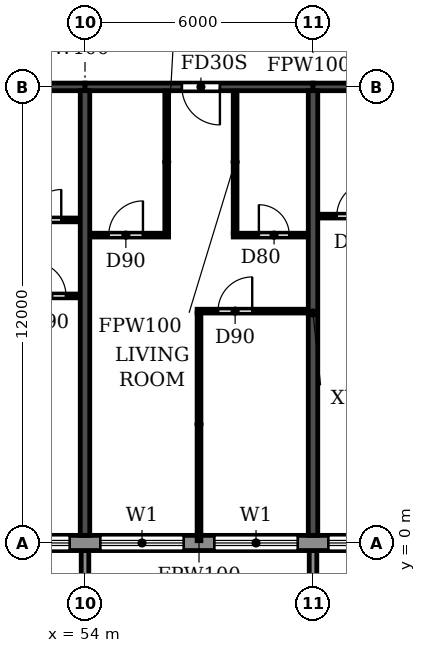
"""IFC4 building model, lengths in metres.
Left out: names, types, materials, properties, quantities, classifications, styles, units other than length and angle.
Written with IfcOpenShell. Run it as: python <this file> out.ifc"""

import sys

from ifc_helpers import new_model, si_unit, direction, frame, frame_2d, origin, place, context, subcontext, project, spatial, polyline, rectangle, outline, extrude, source, transform, mapped, element, fill, save


model = new_model("IFC4")
c1 = context("Model", 3, precision=1e-05, world=origin(), true_north=direction((0.0, 1.0)))
c2 = subcontext(c1, "Body", "Model", "MODEL_VIEW")
j1 = project(units=[si_unit("LENGTHUNIT", "METRE"), si_unit("PLANEANGLEUNIT", "RADIAN")], contexts=[c1])
p1 = place(None, origin())
s1 = spatial("IfcSite", under=j1, at=p1, CompositionType="ELEMENT")
p2 = place(p1, origin())
s2 = spatial("IfcBuilding", under=s1, at=p2, CompositionType="ELEMENT")
p3 = place(p2, frame((0.0, 0.0, 191.7)))
s3 = spatial("IfcBuildingStorey", under=s2, at=p3, CompositionType="ELEMENT", Elevation=191.7)
for number, where, z_axis, x_axis in (
    (1, (54.0, 0.2, 0.0), (0.0, 0.0, 1.0), (0.0, 1.0, 0.0)),
    (2, (60.0, 0.2, 0.0), (0.0, 0.0, 1.0), (0.0, 1.0, 0.0)),
):
    element("IfcWall", number, at=place(p3, frame(where, z_axis=z_axis, x_axis=x_axis)), inside=s3, PredefinedType="SHEAR", context=c2, shape_type="SweptSolid", body=[
        extrude(rectangle(XDim=11.7, YDim=0.25, at=frame_2d((5.85, 0.0))), origin(), (0.0, 0.0, 1.0), 3.08),
    ])
p4 = place(p3, frame((48.0, 12.0, 0.0), z_axis=(0.0, 0.0, 1.0), x_axis=(1.0, 0.0, 0.0)))
e3 = element("IfcWall", 3, at=p4, inside=s3, PredefinedType="SHEAR", context=c2, shape_type="SweptSolid", body=[
    extrude(rectangle(XDim=6.0, YDim=0.2, at=frame_2d((3.0, 0.0))), origin(), (0.0, 0.0, 1.0), 2.48),
])
p5 = place(p4, frame((2.55, 0.0, 0.0)))
e4 = element("IfcOpeningElement", 4, at=p5, cuts=e3, PredefinedType="OPENING", context=c2, shape_type="SweptSolid", body=[
    extrude(rectangle(XDim=1.0, YDim=2.1, at=frame_2d((0.5, 1.05))), frame((0.0, 0.11, 0.0), z_axis=(0.0, -1.0, 0.0), x_axis=(1.0, 0.0, 0.0)), (0.0, 0.0, 1.0), 0.22),
])
p6 = place(p3, frame((54.0, 12.0, 0.0), z_axis=(0.0, 0.0, 1.0), x_axis=(1.0, 0.0, 0.0)))
e5 = element("IfcWall", 5, at=p6, inside=s3, PredefinedType="SHEAR", context=c2, shape_type="SweptSolid", body=[
    extrude(rectangle(XDim=6.0, YDim=0.2, at=frame_2d((3.0, 0.0))), origin(), (0.0, 0.0, 1.0), 2.48),
])
p7 = place(p6, frame((2.55, 0.0, 0.0)))
e6 = element("IfcOpeningElement", 6, at=p7, cuts=e5, PredefinedType="OPENING", context=c2, shape_type="SweptSolid", body=[
    extrude(rectangle(XDim=1.0, YDim=2.1, at=frame_2d((0.5, 1.05))), frame((0.0, 0.11, 0.0), z_axis=(0.0, -1.0, 0.0), x_axis=(1.0, 0.0, 0.0)), (0.0, 0.0, 1.0), 0.22),
])
p8 = place(p3, frame((60.0, 12.0, 0.0), z_axis=(0.0, 0.0, 1.0), x_axis=(1.0, 0.0, 0.0)))
e7 = element("IfcWall", 7, at=p8, inside=s3, PredefinedType="SHEAR", context=c2, shape_type="SweptSolid", body=[
    extrude(rectangle(XDim=6.0, YDim=0.2, at=frame_2d((3.0, 0.0))), origin(), (0.0, 0.0, 1.0), 2.48),
])
p9 = place(p8, frame((2.55, 0.0, 0.0)))
e8 = element("IfcOpeningElement", 8, at=p9, cuts=e7, PredefinedType="OPENING", context=c2, shape_type="SweptSolid", body=[
    extrude(rectangle(XDim=1.0, YDim=2.1, at=frame_2d((0.5, 1.05))), frame((0.0, 0.11, 0.0), z_axis=(0.0, -1.0, 0.0), x_axis=(1.0, 0.0, 0.0)), (0.0, 0.0, 1.0), 0.22),
])
p10 = place(p3, frame((22.683, 0.0, 0.0), z_axis=(0.0, 0.0, 1.0), x_axis=(1.0, 0.0, 0.0)))
e9 = element("IfcWall", 9, at=p10, inside=s3, PredefinedType="STANDARD", context=c2, shape_type="SweptSolid", body=[
    extrude(rectangle(XDim=56.634, YDim=0.4, at=frame_2d((28.317, 0.0))), origin(), (0.0, 0.0, 1.0), 3.08),
])
p11 = place(p10, frame((1.717, 0.0, 0.9)))
e10 = element("IfcOpeningElement", 10, at=p11, cuts=e9, PredefinedType="OPENING", context=c2, shape_type="SweptSolid", body=[
    extrude(rectangle(XDim=2.2, YDim=1.5, at=frame_2d((1.1, 0.75))), frame((0.0, 0.21, 0.0), z_axis=(0.0, -1.0, 0.0), x_axis=(1.0, 0.0, 0.0)), (0.0, 0.0, 1.0), 0.42),
])
p12 = place(p10, frame((4.917, 0.0, 0.0)))
e11 = element("IfcOpeningElement", 11, at=p12, cuts=e9, PredefinedType="OPENING", context=c2, shape_type="SweptSolid", body=[
    extrude(rectangle(XDim=1.8, YDim=2.4, at=frame_2d((0.9, 1.2))), frame((0.0, 0.21, 0.0), z_axis=(0.0, -1.0, 0.0), x_axis=(1.0, 0.0, 0.0)), (0.0, 0.0, 1.0), 0.42),
])
p13 = place(p10, frame((7.717, 0.0, 0.9)))
e12 = element("IfcOpeningElement", 12, at=p13, cuts=e9, PredefinedType="OPENING", context=c2, shape_type="SweptSolid", body=[
    extrude(rectangle(XDim=2.2, YDim=1.5, at=frame_2d((1.1, 0.75))), frame((0.0, 0.21, 0.0), z_axis=(0.0, -1.0, 0.0), x_axis=(1.0, 0.0, 0.0)), (0.0, 0.0, 1.0), 0.42),
])
p14 = place(p10, frame((10.717, 0.0, 0.9)))
e13 = element("IfcOpeningElement", 13, at=p14, cuts=e9, PredefinedType="OPENING", context=c2, shape_type="SweptSolid", body=[
    extrude(rectangle(XDim=2.2, YDim=1.5, at=frame_2d((1.1, 0.75))), frame((0.0, 0.21, 0.0), z_axis=(0.0, -1.0, 0.0), x_axis=(1.0, 0.0, 0.0)), (0.0, 0.0, 1.0), 0.42),
])
p15 = place(p10, frame((13.717, 0.0, 0.9)))
e14 = element("IfcOpeningElement", 14, at=p15, cuts=e9, PredefinedType="OPENING", context=c2, shape_type="SweptSolid", body=[
    extrude(rectangle(XDim=2.2, YDim=1.5, at=frame_2d((1.1, 0.75))), frame((0.0, 0.21, 0.0), z_axis=(0.0, -1.0, 0.0), x_axis=(1.0, 0.0, 0.0)), (0.0, 0.0, 1.0), 0.42),
])
p16 = place(p10, frame((16.917, 0.0, 0.0)))
e15 = element("IfcOpeningElement", 15, at=p16, cuts=e9, PredefinedType="OPENING", context=c2, shape_type="SweptSolid", body=[
    extrude(rectangle(XDim=1.8, YDim=2.4, at=frame_2d((0.9, 1.2))), frame((0.0, 0.21, 0.0), z_axis=(0.0, -1.0, 0.0), x_axis=(1.0, 0.0, 0.0)), (0.0, 0.0, 1.0), 0.42),
])
p17 = place(p10, frame((19.717, 0.0, 0.9)))
e16 = element("IfcOpeningElement", 16, at=p17, cuts=e9, PredefinedType="OPENING", context=c2, shape_type="SweptSolid", body=[
    extrude(rectangle(XDim=2.2, YDim=1.5, at=frame_2d((1.1, 0.75))), frame((0.0, 0.21, 0.0), z_axis=(0.0, -1.0, 0.0), x_axis=(1.0, 0.0, 0.0)), (0.0, 0.0, 1.0), 0.42),
])
p18 = place(p10, frame((22.717, 0.0, 0.9)))
e17 = element("IfcOpeningElement", 17, at=p18, cuts=e9, PredefinedType="OPENING", context=c2, shape_type="SweptSolid", body=[
    extrude(rectangle(XDim=2.2, YDim=1.5, at=frame_2d((1.1, 0.75))), frame((0.0, 0.21, 0.0), z_axis=(0.0, -1.0, 0.0), x_axis=(1.0, 0.0, 0.0)), (0.0, 0.0, 1.0), 0.42),
])
p19 = place(p10, frame((25.917, 0.0, 0.0)))
e18 = element("IfcOpeningElement", 18, at=p19, cuts=e9, PredefinedType="OPENING", context=c2, shape_type="SweptSolid", body=[
    extrude(rectangle(XDim=1.8, YDim=2.4, at=frame_2d((0.9, 1.2))), frame((0.0, 0.21, 0.0), z_axis=(0.0, -1.0, 0.0), x_axis=(1.0, 0.0, 0.0)), (0.0, 0.0, 1.0), 0.42),
])
p20 = place(p10, frame((28.717, 0.0, 0.9)))
e19 = element("IfcOpeningElement", 19, at=p20, cuts=e9, PredefinedType="OPENING", context=c2, shape_type="SweptSolid", body=[
    extrude(rectangle(XDim=2.2, YDim=1.5, at=frame_2d((1.1, 0.75))), frame((0.0, 0.21, 0.0), z_axis=(0.0, -1.0, 0.0), x_axis=(1.0, 0.0, 0.0)), (0.0, 0.0, 1.0), 0.42),
])
p21 = place(p10, frame((31.717, 0.0, 0.9)))
e20 = element("IfcOpeningElement", 20, at=p21, cuts=e9, PredefinedType="OPENING", context=c2, shape_type="SweptSolid", body=[
    extrude(rectangle(XDim=2.2, YDim=1.5, at=frame_2d((1.1, 0.75))), frame((0.0, 0.21, 0.0), z_axis=(0.0, -1.0, 0.0), x_axis=(1.0, 0.0, 0.0)), (0.0, 0.0, 1.0), 0.42),
])
p22 = place(p10, frame((34.717, 0.0, 0.9)))
e21 = element("IfcOpeningElement", 21, at=p22, cuts=e9, PredefinedType="OPENING", context=c2, shape_type="SweptSolid", body=[
    extrude(rectangle(XDim=2.2, YDim=1.5, at=frame_2d((1.1, 0.75))), frame((0.0, 0.21, 0.0), z_axis=(0.0, -1.0, 0.0), x_axis=(1.0, 0.0, 0.0)), (0.0, 0.0, 1.0), 0.42),
])
p23 = place(p10, frame((37.717, 0.0, 0.9)))
e22 = element("IfcOpeningElement", 22, at=p23, cuts=e9, PredefinedType="OPENING", context=c2, shape_type="SweptSolid", body=[
    extrude(rectangle(XDim=2.2, YDim=1.5, at=frame_2d((1.1, 0.75))), frame((0.0, 0.21, 0.0), z_axis=(0.0, -1.0, 0.0), x_axis=(1.0, 0.0, 0.0)), (0.0, 0.0, 1.0), 0.42),
])
p24 = place(p10, frame((40.917, 0.0, 0.0)))
e23 = element("IfcOpeningElement", 23, at=p24, cuts=e9, PredefinedType="OPENING", context=c2, shape_type="SweptSolid", body=[
    extrude(rectangle(XDim=1.8, YDim=2.4, at=frame_2d((0.9, 1.2))), frame((0.0, 0.21, 0.0), z_axis=(0.0, -1.0, 0.0), x_axis=(1.0, 0.0, 0.0)), (0.0, 0.0, 1.0), 0.42),
])
p25 = place(p10, frame((43.717, 0.0, 0.9)))
e24 = element("IfcOpeningElement", 24, at=p25, cuts=e9, PredefinedType="OPENING", context=c2, shape_type="SweptSolid", body=[
    extrude(rectangle(XDim=2.2, YDim=1.5, at=frame_2d((1.1, 0.75))), frame((0.0, 0.21, 0.0), z_axis=(0.0, -1.0, 0.0), x_axis=(1.0, 0.0, 0.0)), (0.0, 0.0, 1.0), 0.42),
])
p26 = place(p10, frame((46.717, 0.0, 0.9)))
e25 = element("IfcOpeningElement", 25, at=p26, cuts=e9, PredefinedType="OPENING", context=c2, shape_type="SweptSolid", body=[
    extrude(rectangle(XDim=2.2, YDim=1.5, at=frame_2d((1.1, 0.75))), frame((0.0, 0.21, 0.0), z_axis=(0.0, -1.0, 0.0), x_axis=(1.0, 0.0, 0.0)), (0.0, 0.0, 1.0), 0.42),
])
p27 = place(p10, frame((49.917, 0.0, 0.0)))
e26 = element("IfcOpeningElement", 26, at=p27, cuts=e9, PredefinedType="OPENING", context=c2, shape_type="SweptSolid", body=[
    extrude(rectangle(XDim=1.8, YDim=2.4, at=frame_2d((0.9, 1.2))), frame((0.0, 0.21, 0.0), z_axis=(0.0, -1.0, 0.0), x_axis=(1.0, 0.0, 0.0)), (0.0, 0.0, 1.0), 0.42),
])
p28 = place(p10, frame((52.717, 0.0, 0.9)))
e27 = element("IfcOpeningElement", 27, at=p28, cuts=e9, PredefinedType="OPENING", context=c2, shape_type="SweptSolid", body=[
    extrude(rectangle(XDim=2.2, YDim=1.5, at=frame_2d((1.1, 0.75))), frame((0.0, 0.21, 0.0), z_axis=(0.0, -1.0, 0.0), x_axis=(1.0, 0.0, 0.0)), (0.0, 0.0, 1.0), 0.42),
])
m1 = source(origin(), c2, "Body", "SweptSolid", [
    extrude(outline(polyline([(0.0, 0.0), (0.2, 0.0), (0.2, 1.65), (0.0, 1.65), (0.0, 0.0)])), origin(), (0.0, 0.0, 1.0), 3.1),
])
for number, where in (
    (28, (53.9, -1.85, 0.0)),
    (29, (59.9, -1.85, 0.0)),
):
    element("IfcWall", number, at=place(p3, frame(where)), inside=s3, PredefinedType="STANDARD", context=c2, shape_type="MappedRepresentation", body=[
        mapped(m1, transform((0.0, 0.0, 0.0))),
    ])
p29 = place(p3, frame((56.95, 6.1, 0.0), z_axis=(0.0, 0.0, 1.0), x_axis=(1.0, 0.0, 0.0)))
e30 = element("IfcWall", 30, at=p29, inside=s3, PredefinedType="PARTITIONING", context=c2, shape_type="SweptSolid", body=[
    extrude(rectangle(XDim=2.915, YDim=0.1, at=frame_2d((1.458, 0.0))), origin(), (0.0, 0.0, 1.0), 3.08),
])
p30 = place(p29, frame((0.55, 0.0, 0.0)))
e31 = element("IfcOpeningElement", 31, at=p30, cuts=e30, PredefinedType="OPENING", context=c2, shape_type="SweptSolid", body=[
    extrude(rectangle(XDim=0.9, YDim=2.1, at=frame_2d((0.45, 1.05))), frame((0.0, 0.06, 0.0), z_axis=(0.0, -1.0, 0.0), x_axis=(1.0, 0.0, 0.0)), (0.0, 0.0, 1.0), 0.12),
])
p31 = place(p3, frame((50.95, 6.5, 0.0), z_axis=(0.0, 0.0, 1.0), x_axis=(1.0, 0.0, 0.0)))
e32 = element("IfcWall", 32, at=p31, inside=s3, PredefinedType="PARTITIONING", context=c2, shape_type="SweptSolid", body=[
    extrude(rectangle(XDim=2.915, YDim=0.1, at=frame_2d((1.458, 0.0))), origin(), (0.0, 0.0, 1.0), 3.08),
])
p32 = place(p31, frame((1.65, 0.0, 0.0)))
e33 = element("IfcOpeningElement", 33, at=p32, cuts=e32, PredefinedType="OPENING", context=c2, shape_type="SweptSolid", body=[
    extrude(rectangle(XDim=0.9, YDim=2.1, at=frame_2d((0.45, 1.05))), frame((0.0, 0.06, 0.0), z_axis=(0.0, -1.0, 0.0), x_axis=(1.0, 0.0, 0.0)), (0.0, 0.0, 1.0), 0.12),
])
p33 = place(p3, frame((54.135, 8.1, 0.0), z_axis=(0.0, 0.0, 1.0), x_axis=(1.0, 0.0, 0.0)))
e34 = element("IfcWall", 34, at=p33, inside=s3, PredefinedType="PARTITIONING", context=c2, shape_type="SweptSolid", body=[
    extrude(rectangle(XDim=2.065, YDim=0.1, at=frame_2d((1.032, 0.0))), origin(), (0.0, 0.0, 1.0), 3.08),
])
p34 = place(p33, frame((0.49, 0.0, 0.0)))
e35 = element("IfcOpeningElement", 35, at=p34, cuts=e34, PredefinedType="OPENING", context=c2, shape_type="SweptSolid", body=[
    extrude(rectangle(XDim=0.9, YDim=2.1, at=frame_2d((0.45, 1.05))), frame((0.0, 0.06, 0.0), z_axis=(0.0, -1.0, 0.0), x_axis=(1.0, 0.0, 0.0)), (0.0, 0.0, 1.0), 0.12),
])
p35 = place(p3, frame((57.9, 8.1, 0.0), z_axis=(0.0, 0.0, 1.0), x_axis=(1.0, 0.0, 0.0)))
e36 = element("IfcWall", 36, at=p35, inside=s3, PredefinedType="PARTITIONING", context=c2, shape_type="SweptSolid", body=[
    extrude(rectangle(XDim=1.965, YDim=0.1, at=frame_2d((0.982, 0.0))), origin(), (0.0, 0.0, 1.0), 3.08),
])
p36 = place(p35, frame((0.675, 0.0, 0.0)))
e37 = element("IfcOpeningElement", 37, at=p36, cuts=e36, PredefinedType="OPENING", context=c2, shape_type="SweptSolid", body=[
    extrude(rectangle(XDim=0.8, YDim=2.1, at=frame_2d((0.4, 1.05))), frame((0.0, 0.06, 0.0), z_axis=(0.0, -1.0, 0.0), x_axis=(1.0, 0.0, 0.0)), (0.0, 0.0, 1.0), 0.12),
])
p37 = place(p3, frame((51.9, 8.5, 0.0), z_axis=(0.0, 0.0, 1.0), x_axis=(1.0, 0.0, 0.0)))
e38 = element("IfcWall", 38, at=p37, inside=s3, PredefinedType="PARTITIONING", context=c2, shape_type="SweptSolid", body=[
    extrude(rectangle(XDim=1.965, YDim=0.1, at=frame_2d((0.982, 0.0))), origin(), (0.0, 0.0, 1.0), 3.08),
])
p38 = place(p37, frame((0.675, 0.0, 0.0)))
e39 = element("IfcOpeningElement", 39, at=p38, cuts=e38, PredefinedType="OPENING", context=c2, shape_type="SweptSolid", body=[
    extrude(rectangle(XDim=0.8, YDim=2.1, at=frame_2d((0.4, 1.05))), frame((0.0, 0.06, 0.0), z_axis=(0.0, -1.0, 0.0), x_axis=(1.0, 0.0, 0.0)), (0.0, 0.0, 1.0), 0.12),
])
p39 = place(p3, frame((60.135, 8.6, 0.0), z_axis=(0.0, 0.0, 1.0), x_axis=(1.0, 0.0, 0.0)))
e40 = element("IfcWall", 40, at=p39, inside=s3, PredefinedType="PARTITIONING", context=c2, shape_type="SweptSolid", body=[
    extrude(rectangle(XDim=2.065, YDim=0.1, at=frame_2d((1.032, 0.0))), origin(), (0.0, 0.0, 1.0), 3.08),
])
p40 = place(p39, frame((0.49, 0.0, 0.0)))
e41 = element("IfcOpeningElement", 41, at=p40, cuts=e40, PredefinedType="OPENING", context=c2, shape_type="SweptSolid", body=[
    extrude(rectangle(XDim=0.9, YDim=2.1, at=frame_2d((0.45, 1.05))), frame((0.0, 0.06, 0.0), z_axis=(0.0, -1.0, 0.0), x_axis=(1.0, 0.0, 0.0)), (0.0, 0.0, 1.0), 0.12),
])
p41 = place(p3, frame((56.15, 8.15, 0.0), z_axis=(0.0, 0.0, 1.0), x_axis=(0.0, 1.0, 0.0)))
e42 = element("IfcWall", 42, at=p41, inside=s3, PredefinedType="PARTITIONING", context=c2, shape_type="SweptSolid", body=[
    extrude(rectangle(XDim=3.74, YDim=0.1, at=frame_2d((1.87, 0.0))), origin(), (0.0, 0.0, 1.0), 3.08),
])
p42 = place(p3, frame((57.0, 0.06, 0.0), z_axis=(0.0, 0.0, 1.0), x_axis=(0.0, 1.0, 0.0)))
e43 = element("IfcWall", 43, at=p42, inside=s3, PredefinedType="PARTITIONING", context=c2, shape_type="SweptSolid", body=[
    extrude(rectangle(XDim=5.99, YDim=0.1, at=frame_2d((2.995, 0.0))), origin(), (0.0, 0.0, 1.0), 3.08),
])
p43 = place(p3, frame((57.95, 8.15, 0.0), z_axis=(0.0, 0.0, 1.0), x_axis=(0.0, 1.0, 0.0)))
e44 = element("IfcWall", 44, at=p43, inside=s3, PredefinedType="PARTITIONING", context=c2, shape_type="SweptSolid", body=[
    extrude(rectangle(XDim=3.74, YDim=0.1, at=frame_2d((1.87, 0.0))), origin(), (0.0, 0.0, 1.0), 3.08),
])
p44 = place(p20, origin())
e45 = element("IfcWindow", 45, at=p44, inside=s3, PartitioningType="DOUBLE_PANEL_HORIZONTAL", PredefinedType="WINDOW", context=c2, shape_type="SweptSolid", body=[
    extrude(rectangle(XDim=2.2, YDim=1.5, at=frame_2d((1.1, 0.75))), frame((0.0, 0.03, 0.0), z_axis=(0.0, -1.0, 0.0), x_axis=(1.0, 0.0, 0.0)), (0.0, 0.0, 1.0), 0.06),
])
fill(e19, e45)
p45 = place(p21, origin())
e46 = element("IfcWindow", 46, at=p45, inside=s3, PartitioningType="DOUBLE_PANEL_HORIZONTAL", PredefinedType="WINDOW", context=c2, shape_type="SweptSolid", body=[
    extrude(rectangle(XDim=2.2, YDim=1.5, at=frame_2d((1.1, 0.75))), frame((0.0, 0.03, 0.0), z_axis=(0.0, -1.0, 0.0), x_axis=(1.0, 0.0, 0.0)), (0.0, 0.0, 1.0), 0.06),
])
fill(e20, e46)
p46 = place(p22, origin())
e47 = element("IfcWindow", 47, at=p46, inside=s3, PartitioningType="DOUBLE_PANEL_HORIZONTAL", PredefinedType="WINDOW", context=c2, shape_type="SweptSolid", body=[
    extrude(rectangle(XDim=2.2, YDim=1.5, at=frame_2d((1.1, 0.75))), frame((0.0, 0.03, 0.0), z_axis=(0.0, -1.0, 0.0), x_axis=(1.0, 0.0, 0.0)), (0.0, 0.0, 1.0), 0.06),
])
fill(e21, e47)
p47 = place(p23, origin())
e48 = element("IfcWindow", 48, at=p47, inside=s3, PartitioningType="DOUBLE_PANEL_HORIZONTAL", PredefinedType="WINDOW", context=c2, shape_type="SweptSolid", body=[
    extrude(rectangle(XDim=2.2, YDim=1.5, at=frame_2d((1.1, 0.75))), frame((0.0, 0.03, 0.0), z_axis=(0.0, -1.0, 0.0), x_axis=(1.0, 0.0, 0.0)), (0.0, 0.0, 1.0), 0.06),
])
fill(e22, e48)
p48 = place(p38, origin())
e49 = element("IfcDoor", 49, at=p48, inside=s3, OperationType="SINGLE_SWING_RIGHT", PredefinedType="DOOR", context=c2, shape_type="SweptSolid", body=[
    extrude(rectangle(XDim=0.8, YDim=2.1, at=frame_2d((0.4, 1.05))), frame((0.0, 0.025, 0.0), z_axis=(0.0, -1.0, 0.0), x_axis=(1.0, 0.0, 0.0)), (0.0, 0.0, 1.0), 0.05),
])
fill(e39, e49)
p49 = place(p32, origin())
e50 = element("IfcDoor", 50, at=p49, inside=s3, OperationType="SINGLE_SWING_LEFT", PredefinedType="DOOR", context=c2, shape_type="SweptSolid", body=[
    extrude(rectangle(XDim=0.9, YDim=2.1, at=frame_2d((0.45, 1.05))), frame((0.0, 0.025, 0.0), z_axis=(0.0, -1.0, 0.0), x_axis=(1.0, 0.0, 0.0)), (0.0, 0.0, 1.0), 0.05),
])
fill(e33, e50)
p50 = place(p34, origin())
e51 = element("IfcDoor", 51, at=p50, inside=s3, OperationType="SINGLE_SWING_RIGHT", PredefinedType="DOOR", context=c2, shape_type="SweptSolid", body=[
    extrude(rectangle(XDim=0.9, YDim=2.1, at=frame_2d((0.45, 1.05))), frame((0.0, 0.025, 0.0), z_axis=(0.0, -1.0, 0.0), x_axis=(1.0, 0.0, 0.0)), (0.0, 0.0, 1.0), 0.05),
])
fill(e35, e51)
p51 = place(p7, frame((1.0, 0.0, 0.0), z_axis=(0.0, 0.0, 1.0), x_axis=(-1.0, 0.0, 0.0)))
e52 = element("IfcDoor", 52, at=p51, inside=s3, OperationType="SINGLE_SWING_LEFT", PredefinedType="DOOR", context=c2, shape_type="SweptSolid", body=[
    extrude(rectangle(XDim=1.0, YDim=2.1, at=frame_2d((0.5, 1.05))), frame((0.0, 0.025, 0.0), z_axis=(0.0, -1.0, 0.0), x_axis=(1.0, 0.0, 0.0)), (0.0, 0.0, 1.0), 0.05),
])
fill(e6, e52)
p52 = place(p30, origin())
e53 = element("IfcDoor", 53, at=p52, inside=s3, OperationType="SINGLE_SWING_RIGHT", PredefinedType="DOOR", context=c2, shape_type="SweptSolid", body=[
    extrude(rectangle(XDim=0.9, YDim=2.1, at=frame_2d((0.45, 1.05))), frame((0.0, 0.025, 0.0), z_axis=(0.0, -1.0, 0.0), x_axis=(1.0, 0.0, 0.0)), (0.0, 0.0, 1.0), 0.05),
])
fill(e31, e53)
p53 = place(p36, origin())
e54 = element("IfcDoor", 54, at=p53, inside=s3, OperationType="SINGLE_SWING_LEFT", PredefinedType="DOOR", context=c2, shape_type="SweptSolid", body=[
    extrude(rectangle(XDim=0.8, YDim=2.1, at=frame_2d((0.4, 1.05))), frame((0.0, 0.025, 0.0), z_axis=(0.0, -1.0, 0.0), x_axis=(1.0, 0.0, 0.0)), (0.0, 0.0, 1.0), 0.05),
])
fill(e37, e54)
p54 = place(p40, origin())
e55 = element("IfcDoor", 55, at=p54, inside=s3, OperationType="SINGLE_SWING_RIGHT", PredefinedType="DOOR", context=c2, shape_type="SweptSolid", body=[
    extrude(rectangle(XDim=0.9, YDim=2.1, at=frame_2d((0.45, 1.05))), frame((0.0, 0.025, 0.0), z_axis=(0.0, -1.0, 0.0), x_axis=(1.0, 0.0, 0.0)), (0.0, 0.0, 1.0), 0.05),
])
fill(e41, e55)
save(model, sys.argv[1])
